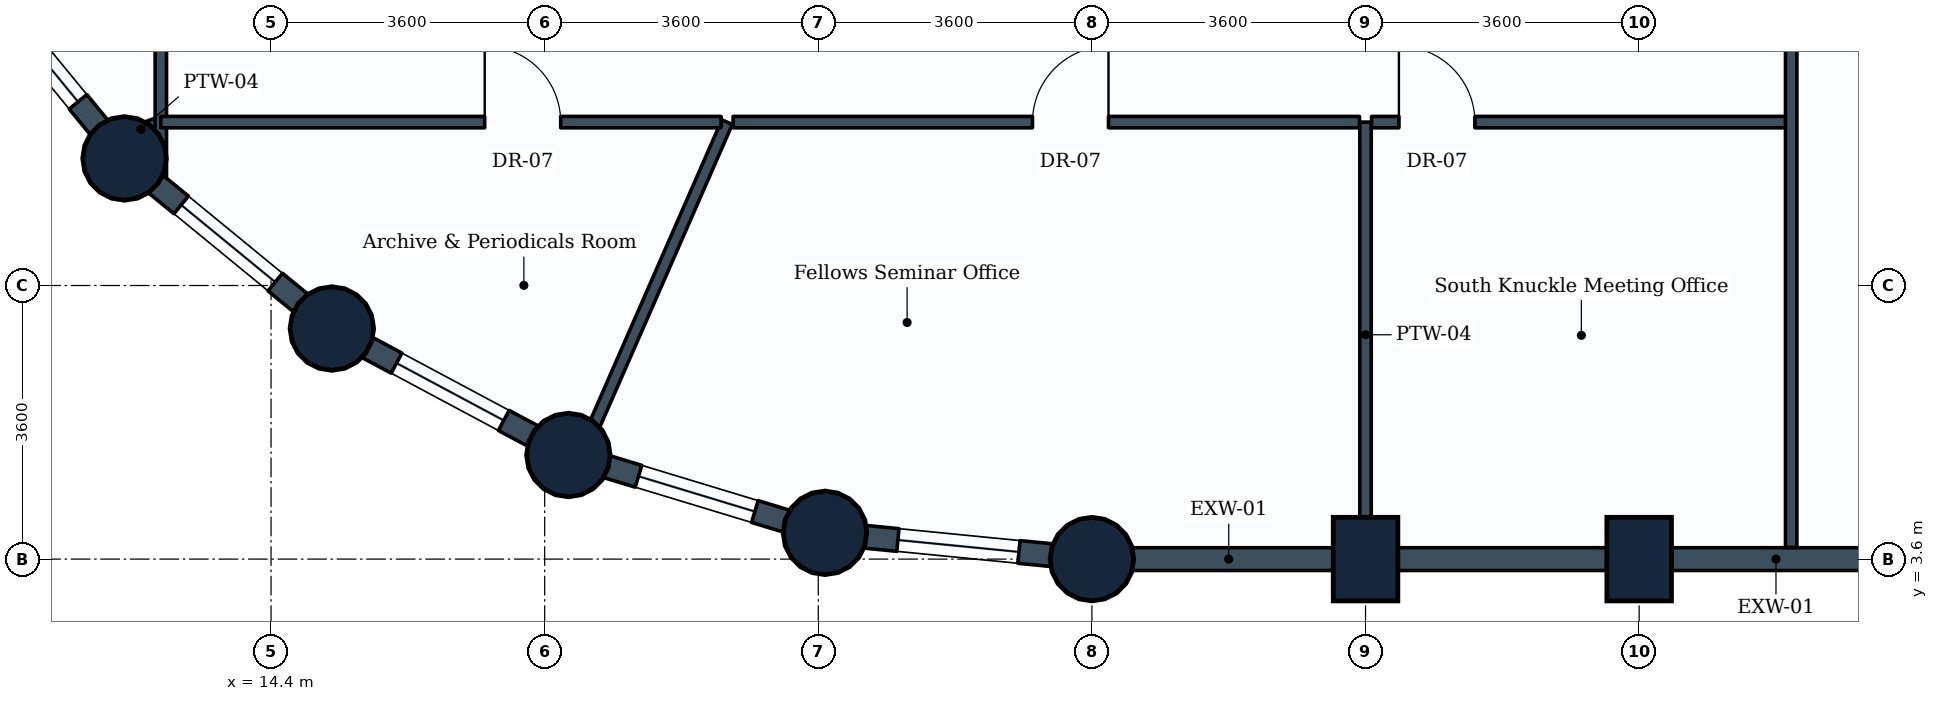
"""IFC4 building model, lengths in metres.
Left out: names, types, materials, properties, quantities, classifications, styles, units other than length and angle.
Written with IfcOpenShell. Run it as: python <this file> out.ifc"""

import sys

from ifc_helpers import new_model, si_unit, direction, frame, frame_2d, origin, origin_2d, place, context, subcontext, project, spatial, rectangle, circle, extrude, element, fill, save


model = new_model("IFC4")
c1 = context("Model", 3, precision=1e-05, world=origin(), true_north=direction((0.0, 1.0)))
c2 = subcontext(c1, "Body", "Model", "MODEL_VIEW")
j1 = project(units=[si_unit("LENGTHUNIT", "METRE"), si_unit("PLANEANGLEUNIT", "RADIAN")], contexts=[c1])
p1 = place(None, origin())
s1 = spatial("IfcSite", under=j1, at=p1, CompositionType="ELEMENT")
p2 = place(p1, origin())
s2 = spatial("IfcBuilding", under=s1, at=p2, CompositionType="ELEMENT")
p3 = place(p2, frame((0.0, 0.0, 84.0)))
s3 = spatial("IfcBuildingStorey", under=s2, at=p3, CompositionType="ELEMENT", Elevation=84.0)
for number, where, z_axis, x_axis in (
    (1, (12.472, 8.872, 0.0), (0.0, 0.0, 1.0), (1.0, 0.0, 0.0)),
    (2, (15.2, 6.634, 0.0), (0.0, 0.0, 1.0), (1.0, 0.0, 0.0)),
    (3, (18.312, 4.97, 0.0), (0.0, 0.0, 1.0), (1.0, 0.0, 0.0)),
    (4, (21.688, 3.946, 0.0), (0.0, 0.0, 1.0), (1.0, 0.0, 0.0)),
    (5, (25.2, 3.6, 0.0), (0.0, 0.0, 1.0), (1.0, 0.0, 0.0)),
):
    element("IfcColumn", number, at=place(p3, frame(where, z_axis=z_axis, x_axis=x_axis)), inside=s3, PredefinedType="COLUMN", context=c2, shape_type="SweptSolid", body=[
        extrude(circle(Radius=0.55, at=origin_2d()), origin(), (0.0, 0.0, 1.0), 3.9),
    ])
for number, where, z_axis, x_axis in (
    (6, (28.8, 3.6, 0.0), (0.0, 0.0, 1.0), (1.0, 0.0, 0.0)),
    (7, (32.4, 3.6, 0.0), (0.0, 0.0, 1.0), (1.0, 0.0, 0.0)),
):
    element("IfcColumn", number, at=place(p3, frame(where, z_axis=z_axis, x_axis=x_axis)), inside=s3, PredefinedType="COLUMN", context=c2, shape_type="SweptSolid", body=[
        extrude(rectangle(XDim=0.85, YDim=1.1, at=origin_2d()), origin(), (0.0, 0.0, 1.0), 3.9),
    ])
p4 = place(p3, frame((28.8, 3.6, 0.0), z_axis=(0.0, 0.0, 1.0), x_axis=(-1.0, 0.0, 0.0)))
e8 = element("IfcWall", 8, at=p4, inside=s3, PredefinedType="STANDARD", context=c2, shape_type="SweptSolid", body=[
    extrude(rectangle(XDim=3.6, YDim=0.3, at=frame_2d((1.8, 0.0))), origin(), (0.0, 0.0, 1.0), 2.93),
])
p5 = place(p3, frame((32.4, 3.6, 0.0), z_axis=(0.0, 0.0, 1.0), x_axis=(-1.0, 0.0, 0.0)))
e9 = element("IfcWall", 9, at=p5, inside=s3, PredefinedType="STANDARD", context=c2, shape_type="SweptSolid", body=[
    extrude(rectangle(XDim=3.6, YDim=0.3, at=frame_2d((1.8, 0.0))), origin(), (0.0, 0.0, 1.0), 2.93),
])
p6 = place(p3, frame((36.0, 3.6, 0.0), z_axis=(0.0, 0.0, 1.0), x_axis=(-1.0, 0.0, 0.0)))
e10 = element("IfcWall", 10, at=p6, inside=s3, PredefinedType="STANDARD", context=c2, shape_type="SweptSolid", body=[
    extrude(rectangle(XDim=3.6, YDim=0.3, at=frame_2d((1.8, 0.0))), origin(), (0.0, 0.0, 1.0), 2.93),
])
p7 = place(p3, frame((12.472, 8.872, 0.0), z_axis=(0.0, 0.0, 1.0), x_axis=(-0.634258295121, 0.773121216285, 0.0)))
e11 = element("IfcWall", 11, at=p7, inside=s3, PredefinedType="STANDARD", context=c2, shape_type="SweptSolid", body=[
    extrude(rectangle(XDim=3.529, YDim=0.3, at=frame_2d((1.764, 0.0))), origin(), (0.0, 0.0, 1.0), 2.93),
])
p8 = place(p7, frame((0.964, 0.0, 0.85)))
e12 = element("IfcOpeningElement", 12, at=p8, cuts=e11, PredefinedType="OPENING", context=c2, shape_type="SweptSolid", body=[
    extrude(rectangle(XDim=1.6, YDim=1.35, at=frame_2d((0.8, 0.675))), frame((0.0, 0.16, 0.0), z_axis=(0.0, -1.0, 0.0), x_axis=(1.0, 0.0, 0.0)), (0.0, 0.0, 1.0), 0.32),
])
p9 = place(p3, frame((15.2, 6.634, 0.0), z_axis=(0.0, 0.0, 1.0), x_axis=(-0.773121216285, 0.634258295121, 0.0)))
e13 = element("IfcWall", 13, at=p9, inside=s3, PredefinedType="STANDARD", context=c2, shape_type="SweptSolid", body=[
    extrude(rectangle(XDim=3.529, YDim=0.3, at=frame_2d((1.764, 0.0))), origin(), (0.0, 0.0, 1.0), 2.93),
])
p10 = place(p9, frame((0.964, 0.0, 0.85)))
e14 = element("IfcOpeningElement", 14, at=p10, cuts=e13, PredefinedType="OPENING", context=c2, shape_type="SweptSolid", body=[
    extrude(rectangle(XDim=1.6, YDim=1.35, at=frame_2d((0.8, 0.675))), frame((0.0, 0.16, 0.0), z_axis=(0.0, -1.0, 0.0), x_axis=(1.0, 0.0, 0.0)), (0.0, 0.0, 1.0), 0.32),
])
p11 = place(p3, frame((18.312, 4.97, 0.0), z_axis=(0.0, 0.0, 1.0), x_axis=(-0.881846862014, 0.471535907389, 0.0)))
e15 = element("IfcWall", 15, at=p11, inside=s3, PredefinedType="STANDARD", context=c2, shape_type="SweptSolid", body=[
    extrude(rectangle(XDim=3.529, YDim=0.3, at=frame_2d((1.765, 0.0))), origin(), (0.0, 0.0, 1.0), 2.93),
])
p12 = place(p11, frame((0.964, 0.0, 0.85)))
e16 = element("IfcOpeningElement", 16, at=p12, cuts=e15, PredefinedType="OPENING", context=c2, shape_type="SweptSolid", body=[
    extrude(rectangle(XDim=1.6, YDim=1.35, at=frame_2d((0.8, 0.675))), frame((0.0, 0.16, 0.0), z_axis=(0.0, -1.0, 0.0), x_axis=(1.0, 0.0, 0.0)), (0.0, 0.0, 1.0), 0.32),
])
p13 = place(p3, frame((21.688, 3.946, 0.0), z_axis=(0.0, 0.0, 1.0), x_axis=(-0.956953367403, 0.290241714123, 0.0)))
e17 = element("IfcWall", 17, at=p13, inside=s3, PredefinedType="STANDARD", context=c2, shape_type="SweptSolid", body=[
    extrude(rectangle(XDim=3.528, YDim=0.3, at=frame_2d((1.764, 0.0))), origin(), (0.0, 0.0, 1.0), 2.93),
])
p14 = place(p13, frame((0.964, 0.0, 0.85)))
e18 = element("IfcOpeningElement", 18, at=p14, cuts=e17, PredefinedType="OPENING", context=c2, shape_type="SweptSolid", body=[
    extrude(rectangle(XDim=1.6, YDim=1.35, at=frame_2d((0.8, 0.675))), frame((0.0, 0.16, 0.0), z_axis=(0.0, -1.0, 0.0), x_axis=(1.0, 0.0, 0.0)), (0.0, 0.0, 1.0), 0.32),
])
p15 = place(p3, frame((25.2, 3.6, 0.0), z_axis=(0.0, 0.0, 1.0), x_axis=(-0.995183369056, 0.098030923459, 0.0)))
e19 = element("IfcWall", 19, at=p15, inside=s3, PredefinedType="STANDARD", context=c2, shape_type="SweptSolid", body=[
    extrude(rectangle(XDim=3.529, YDim=0.3, at=frame_2d((1.765, 0.0))), origin(), (0.0, 0.0, 1.0), 2.93),
])
p16 = place(p15, frame((0.965, 0.0, 0.85)))
e20 = element("IfcOpeningElement", 20, at=p16, cuts=e19, PredefinedType="OPENING", context=c2, shape_type="SweptSolid", body=[
    extrude(rectangle(XDim=1.6, YDim=1.35, at=frame_2d((0.8, 0.675))), frame((0.0, 0.16, 0.0), z_axis=(0.0, -1.0, 0.0), x_axis=(1.0, 0.0, 0.0)), (0.0, 0.0, 1.0), 0.32),
])
p17 = place(p3, frame((28.8, 9.35, 0.0), z_axis=(0.0, 0.0, 1.0), x_axis=(0.0, -1.0, 0.0)))
e21 = element("IfcWall", 21, at=p17, inside=s3, PredefinedType="PARTITIONING", context=c2, shape_type="SweptSolid", body=[
    extrude(rectangle(XDim=5.596, YDim=0.15, at=frame_2d((2.798, 0.0))), origin(), (0.0, 0.0, 1.0), 3.635),
])
p18 = place(p3, frame((12.95, 9.35, 0.0), z_axis=(0.0, 0.0, 1.0), x_axis=(-0.939538101119, -0.342444384601, 0.0)))
e22 = element("IfcWall", 22, at=p18, inside=s3, PredefinedType="PARTITIONING", context=c2, shape_type="SweptSolid", body=[
    extrude(rectangle(XDim=0.559, YDim=0.15, at=frame_2d((0.279, 0.0))), origin(), (0.0, 0.0, 1.0), 2.93),
])
p19 = place(p3, frame((20.4, 9.35, 0.0), z_axis=(0.0, 0.0, 1.0), x_axis=(-0.400957621756, -0.916096602742, 0.0)))
e23 = element("IfcWall", 23, at=p19, inside=s3, PredefinedType="PARTITIONING", context=c2, shape_type="SweptSolid", body=[
    extrude(rectangle(XDim=4.706, YDim=0.15, at=frame_2d((2.353, 0.0))), origin(), (0.0, 0.0, 1.0), 2.93),
])
p20 = place(p3, frame((12.95, 8.634, 0.0), z_axis=(0.0, 0.0, 1.0), x_axis=(0.0, 1.0, 0.0)))
e24 = element("IfcWall", 24, at=p20, inside=s3, PredefinedType="PARTITIONING", context=c2, shape_type="SweptSolid", body=[
    extrude(rectangle(XDim=8.087, YDim=0.15, at=frame_2d((4.043, 0.0))), origin(), (0.0, 0.0, 1.0), 2.93),
])
p21 = place(p20, frame((4.977, 0.0, 0.0)))
e25 = element("IfcOpeningElement", 25, at=p21, cuts=e24, PredefinedType="OPENING", context=c2, shape_type="SweptSolid", body=[
    extrude(rectangle(XDim=1.0, YDim=2.1, at=frame_2d((0.5, 1.05))), frame((0.0, 0.085, 0.0), z_axis=(0.0, -1.0, 0.0), x_axis=(1.0, 0.0, 0.0)), (0.0, 0.0, 1.0), 0.17),
])
p22 = place(p3, frame((12.95, 9.35, 0.0), z_axis=(0.0, 0.0, 1.0), x_axis=(1.0, 0.0, 0.0)))
e26 = element("IfcWall", 26, at=p22, inside=s3, PredefinedType="PARTITIONING", context=c2, shape_type="SweptSolid", body=[
    extrude(rectangle(XDim=7.371, YDim=0.15, at=frame_2d((3.686, 0.0))), origin(), (0.0, 0.0, 1.0), 3.19),
])
p23 = place(p22, frame((4.261, 0.0, 0.0)))
e27 = element("IfcOpeningElement", 27, at=p23, cuts=e26, PredefinedType="OPENING", context=c2, shape_type="SweptSolid", body=[
    extrude(rectangle(XDim=1.0, YDim=2.1, at=frame_2d((0.5, 1.05))), frame((0.0, 0.085, 0.0), z_axis=(0.0, -1.0, 0.0), x_axis=(1.0, 0.0, 0.0)), (0.0, 0.0, 1.0), 0.17),
])
p24 = place(p3, frame((20.479, 9.35, 0.0), z_axis=(0.0, 0.0, 1.0), x_axis=(1.0, 0.0, 0.0)))
e28 = element("IfcWall", 28, at=p24, inside=s3, PredefinedType="PARTITIONING", context=c2, shape_type="SweptSolid", body=[
    extrude(rectangle(XDim=8.242, YDim=0.15, at=frame_2d((4.121, 0.0))), origin(), (0.0, 0.0, 1.0), 3.18),
])
p25 = place(p24, frame((3.939, 0.0, 0.0)))
e29 = element("IfcOpeningElement", 29, at=p25, cuts=e28, PredefinedType="OPENING", context=c2, shape_type="SweptSolid", body=[
    extrude(rectangle(XDim=1.0, YDim=2.1, at=frame_2d((0.5, 1.05))), frame((0.0, 0.085, 0.0), z_axis=(0.0, -1.0, 0.0), x_axis=(1.0, 0.0, 0.0)), (0.0, 0.0, 1.0), 0.17),
])
p26 = place(p3, frame((28.879, 9.35, 0.0), z_axis=(0.0, 0.0, 1.0), x_axis=(1.0, 0.0, 0.0)))
e30 = element("IfcWall", 30, at=p26, inside=s3, PredefinedType="PARTITIONING", context=c2, shape_type="SweptSolid", body=[
    extrude(rectangle(XDim=5.521, YDim=0.15, at=frame_2d((2.76, 0.0))), origin(), (0.0, 0.0, 1.0), 3.635),
])
p27 = place(p26, frame((0.36, 0.0, 0.0)))
e31 = element("IfcOpeningElement", 31, at=p27, cuts=e30, PredefinedType="OPENING", context=c2, shape_type="SweptSolid", body=[
    extrude(rectangle(XDim=1.0, YDim=2.1, at=frame_2d((0.5, 1.05))), frame((0.0, 0.085, 0.0), z_axis=(0.0, -1.0, 0.0), x_axis=(1.0, 0.0, 0.0)), (0.0, 0.0, 1.0), 0.17),
])
p28 = place(p3, frame((34.4, 3.754, 0.0), z_axis=(0.0, 0.0, 1.0), x_axis=(0.0, 1.0, 0.0)))
e32 = element("IfcWall", 32, at=p28, inside=s3, PredefinedType="PARTITIONING", context=c2, shape_type="SweptSolid", body=[
    extrude(rectangle(XDim=6.896, YDim=0.15, at=frame_2d((3.448, 0.0))), origin(), (0.0, 0.0, 1.0), 2.93),
])
p29 = place(p8, origin())
e33 = element("IfcWindow", 33, at=p29, inside=s3, PartitioningType="SINGLE_PANEL", PredefinedType="WINDOW", context=c2, shape_type="SweptSolid", body=[
    extrude(rectangle(XDim=1.6, YDim=1.35, at=frame_2d((0.8, 0.675))), frame((0.0, 0.03, 0.0), z_axis=(0.0, -1.0, 0.0), x_axis=(1.0, 0.0, 0.0)), (0.0, 0.0, 1.0), 0.06),
])
fill(e12, e33)
p30 = place(p10, origin())
e34 = element("IfcWindow", 34, at=p30, inside=s3, PartitioningType="SINGLE_PANEL", PredefinedType="WINDOW", context=c2, shape_type="SweptSolid", body=[
    extrude(rectangle(XDim=1.6, YDim=1.35, at=frame_2d((0.8, 0.675))), frame((0.0, 0.03, 0.0), z_axis=(0.0, -1.0, 0.0), x_axis=(1.0, 0.0, 0.0)), (0.0, 0.0, 1.0), 0.06),
])
fill(e14, e34)
p31 = place(p12, origin())
e35 = element("IfcWindow", 35, at=p31, inside=s3, PartitioningType="SINGLE_PANEL", PredefinedType="WINDOW", context=c2, shape_type="SweptSolid", body=[
    extrude(rectangle(XDim=1.6, YDim=1.35, at=frame_2d((0.8, 0.675))), frame((0.0, 0.03, 0.0), z_axis=(0.0, -1.0, 0.0), x_axis=(1.0, 0.0, 0.0)), (0.0, 0.0, 1.0), 0.06),
])
fill(e16, e35)
p32 = place(p14, origin())
e36 = element("IfcWindow", 36, at=p32, inside=s3, PartitioningType="SINGLE_PANEL", PredefinedType="WINDOW", context=c2, shape_type="SweptSolid", body=[
    extrude(rectangle(XDim=1.6, YDim=1.35, at=frame_2d((0.8, 0.675))), frame((0.0, 0.03, 0.0), z_axis=(0.0, -1.0, 0.0), x_axis=(1.0, 0.0, 0.0)), (0.0, 0.0, 1.0), 0.06),
])
fill(e18, e36)
p33 = place(p16, origin())
e37 = element("IfcWindow", 37, at=p33, inside=s3, PartitioningType="SINGLE_PANEL", PredefinedType="WINDOW", context=c2, shape_type="SweptSolid", body=[
    extrude(rectangle(XDim=1.6, YDim=1.35, at=frame_2d((0.8, 0.675))), frame((0.0, 0.03, 0.0), z_axis=(0.0, -1.0, 0.0), x_axis=(1.0, 0.0, 0.0)), (0.0, 0.0, 1.0), 0.06),
])
fill(e20, e37)
p34 = place(p23, origin())
e38 = element("IfcDoor", 38, at=p34, inside=s3, OperationType="SINGLE_SWING_LEFT", PredefinedType="DOOR", context=c2, shape_type="SweptSolid", body=[
    extrude(rectangle(XDim=1.0, YDim=2.1, at=frame_2d((0.5, 1.05))), frame((0.0, 0.025, 0.0), z_axis=(0.0, -1.0, 0.0), x_axis=(1.0, 0.0, 0.0)), (0.0, 0.0, 1.0), 0.05),
])
fill(e27, e38)
p35 = place(p25, origin())
e39 = element("IfcDoor", 39, at=p35, inside=s3, OperationType="SINGLE_SWING_RIGHT", PredefinedType="DOOR", context=c2, shape_type="SweptSolid", body=[
    extrude(rectangle(XDim=1.0, YDim=2.1, at=frame_2d((0.5, 1.05))), frame((0.0, 0.025, 0.0), z_axis=(0.0, -1.0, 0.0), x_axis=(1.0, 0.0, 0.0)), (0.0, 0.0, 1.0), 0.05),
])
fill(e29, e39)
p36 = place(p27, origin())
e40 = element("IfcDoor", 40, at=p36, inside=s3, OperationType="SINGLE_SWING_LEFT", PredefinedType="DOOR", context=c2, shape_type="SweptSolid", body=[
    extrude(rectangle(XDim=1.0, YDim=2.1, at=frame_2d((0.5, 1.05))), frame((0.0, 0.025, 0.0), z_axis=(0.0, -1.0, 0.0), x_axis=(1.0, 0.0, 0.0)), (0.0, 0.0, 1.0), 0.05),
])
fill(e31, e40)
save(model, sys.argv[1])
